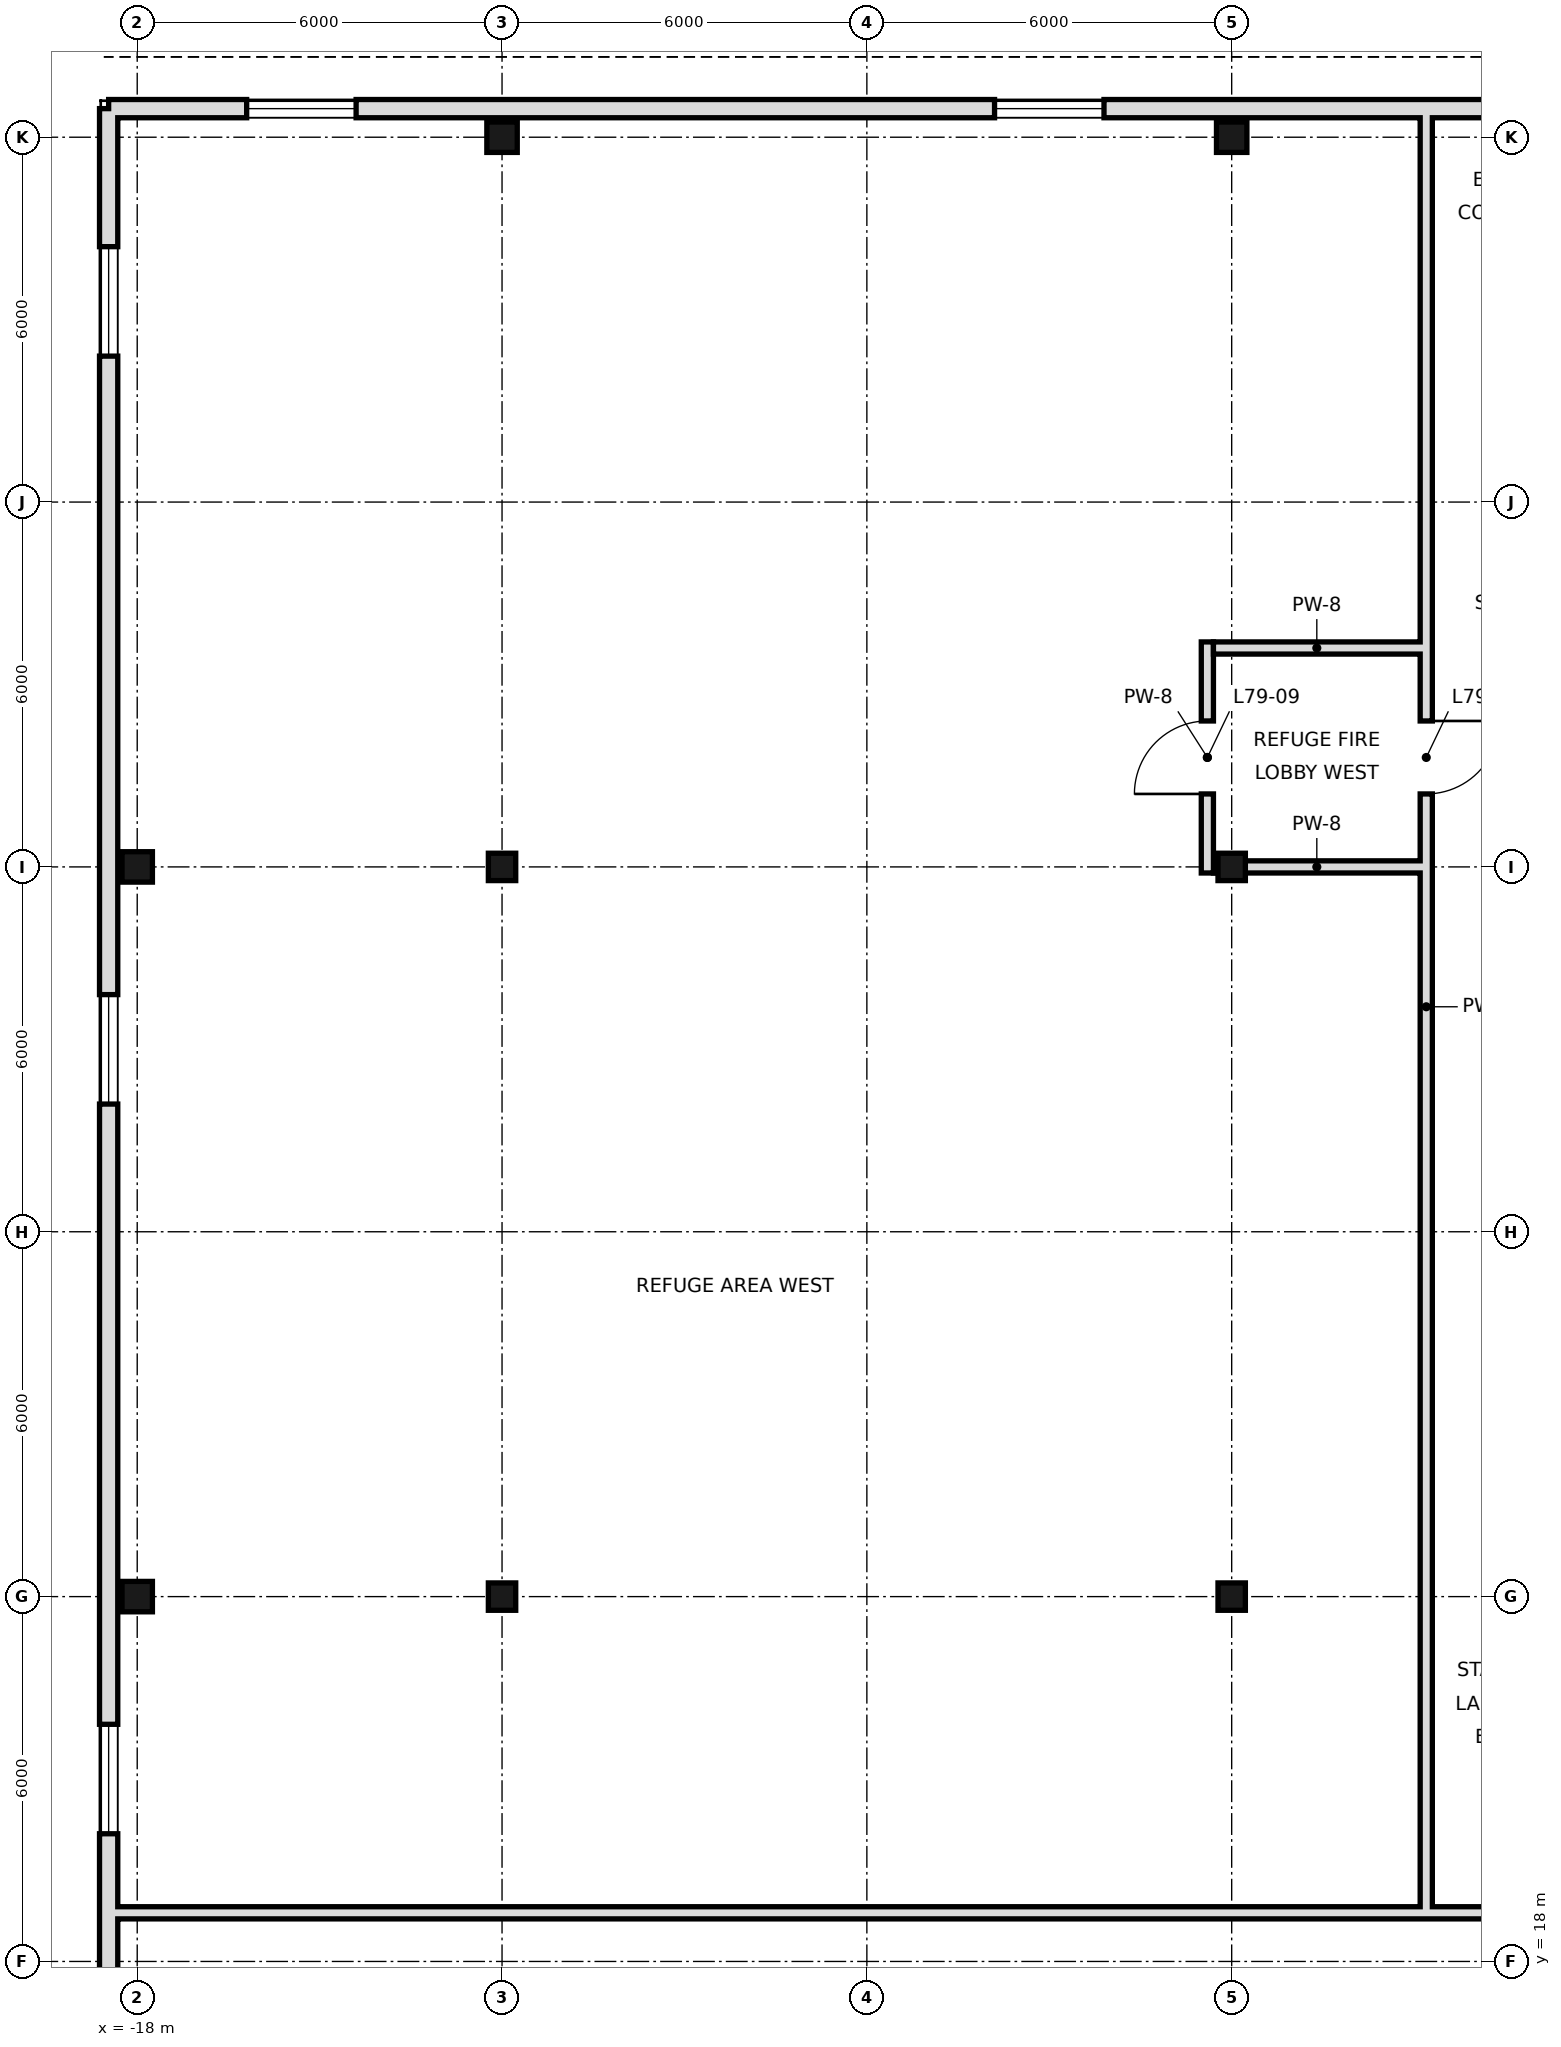
"""IFC4 building model, lengths in metres.
Left out: names, types, materials, properties, quantities, classifications, styles, units other than length and angle.
Written with IfcOpenShell. Run it as: python <this file> out.ifc"""

import sys

from ifc_helpers import new_model, si_unit, direction, frame, frame_2d, origin, origin_2d, place, context, subcontext, project, spatial, rectangle, hollow_rectangle, extrude, element, fill, save


model = new_model("IFC4")
c1 = context("Model", 3, precision=1e-05, world=origin(), true_north=direction((0.0, 1.0)))
c2 = subcontext(c1, "Body", "Model", "MODEL_VIEW")
j1 = project(units=[si_unit("LENGTHUNIT", "METRE"), si_unit("PLANEANGLEUNIT", "RADIAN")], contexts=[c1])
p1 = place(None, origin())
s1 = spatial("IfcSite", under=j1, at=p1, CompositionType="ELEMENT")
p2 = place(p1, origin())
s2 = spatial("IfcBuilding", under=s1, at=p2, CompositionType="ELEMENT")
p3 = place(p2, frame((0.0, 0.0, 331.2)))
s3 = spatial("IfcBuildingStorey", under=s2, at=p3, CompositionType="ELEMENT", Elevation=331.2)
for number, where, z_axis, x_axis in (
    (1, (-18.0, 24.0, 0.0), (0.0, 0.0, 1.0), (1.0, 0.0, 0.0)),
    (2, (-18.0, 36.0, 0.0), (0.0, 0.0, 1.0), (1.0, 0.0, 0.0)),
):
    element("IfcColumn", number, at=place(p3, frame(where, z_axis=z_axis, x_axis=x_axis)), inside=s3, PredefinedType="COLUMN", context=c2, shape_type="SweptSolid", body=[
        extrude(hollow_rectangle(XDim=0.5, YDim=0.5, WallThickness=0.025, at=origin_2d()), origin(), (0.0, 0.0, 1.0), 6.6),
    ])
for number, where, z_axis, x_axis in (
    (3, (-12.0, 24.0, 0.0), (0.0, 0.0, 1.0), (1.0, 0.0, 0.0)),
    (4, (-12.0, 36.0, 0.0), (0.0, 0.0, 1.0), (1.0, 0.0, 0.0)),
):
    element("IfcColumn", number, at=place(p3, frame(where, z_axis=z_axis, x_axis=x_axis)), inside=s3, PredefinedType="COLUMN", context=c2, shape_type="SweptSolid", body=[
        extrude(hollow_rectangle(XDim=0.45, YDim=0.45, WallThickness=0.022, at=origin_2d()), origin(), (0.0, 0.0, 1.0), 6.6),
    ])
p4 = place(p3, frame((-12.0, 48.0, 0.0), z_axis=(0.0, 0.0, 1.0), x_axis=(1.0, 0.0, 0.0)))
e5 = element("IfcColumn", 5, at=p4, inside=s3, PredefinedType="COLUMN", context=c2, shape_type="SweptSolid", body=[
    extrude(hollow_rectangle(XDim=0.5, YDim=0.5, WallThickness=0.025, at=origin_2d()), origin(), (0.0, 0.0, 1.0), 6.6),
])
for number, where, z_axis, x_axis in (
    (6, (0.0, 24.0, 0.0), (0.0, 0.0, 1.0), (1.0, 0.0, 0.0)),
    (7, (0.0, 36.0, 0.0), (0.0, 0.0, 1.0), (1.0, 0.0, 0.0)),
):
    element("IfcColumn", number, at=place(p3, frame(where, z_axis=z_axis, x_axis=x_axis)), inside=s3, PredefinedType="COLUMN", context=c2, shape_type="SweptSolid", body=[
        extrude(hollow_rectangle(XDim=0.45, YDim=0.45, WallThickness=0.022, at=origin_2d()), origin(), (0.0, 0.0, 1.0), 6.6),
    ])
p5 = place(p3, frame((0.0, 48.0, 0.0), z_axis=(0.0, 0.0, 1.0), x_axis=(1.0, 0.0, 0.0)))
e8 = element("IfcColumn", 8, at=p5, inside=s3, PredefinedType="COLUMN", context=c2, shape_type="SweptSolid", body=[
    extrude(hollow_rectangle(XDim=0.5, YDim=0.5, WallThickness=0.025, at=origin_2d()), origin(), (0.0, 0.0, 1.0), 6.6),
])
p6 = place(p3, frame((48.47, 48.47, 0.0), z_axis=(0.0, 0.0, 1.0), x_axis=(-1.0, 0.0, 0.0)))
e9 = element("IfcWall", 9, at=p6, inside=s3, PredefinedType="SOLIDWALL", context=c2, shape_type="SweptSolid", body=[
    extrude(rectangle(XDim=66.94, YDim=0.3, at=frame_2d((33.47, 0.0))), origin(), (0.0, 0.0, 1.0), 6.35),
])
p7 = place(p6, frame((2.27, 0.0, 0.9)))
e10 = element("IfcOpeningElement", 10, at=p7, cuts=e9, PredefinedType="OPENING", context=c2, shape_type="SweptSolid", body=[
    extrude(rectangle(XDim=1.8, YDim=1.5, at=frame_2d((0.9, 0.75))), frame((0.0, 0.16, 0.0), z_axis=(0.0, -1.0, 0.0), x_axis=(1.0, 0.0, 0.0)), (0.0, 0.0, 1.0), 0.32),
])
p8 = place(p6, frame((14.57, 0.0, 0.9)))
e11 = element("IfcOpeningElement", 11, at=p8, cuts=e9, PredefinedType="OPENING", context=c2, shape_type="SweptSolid", body=[
    extrude(rectangle(XDim=1.8, YDim=1.5, at=frame_2d((0.9, 0.75))), frame((0.0, 0.16, 0.0), z_axis=(0.0, -1.0, 0.0), x_axis=(1.0, 0.0, 0.0)), (0.0, 0.0, 1.0), 0.32),
])
p9 = place(p6, frame((26.57, 0.0, 0.9)))
e12 = element("IfcOpeningElement", 12, at=p9, cuts=e9, PredefinedType="OPENING", context=c2, shape_type="SweptSolid", body=[
    extrude(rectangle(XDim=1.8, YDim=1.5, at=frame_2d((0.9, 0.75))), frame((0.0, 0.16, 0.0), z_axis=(0.0, -1.0, 0.0), x_axis=(1.0, 0.0, 0.0)), (0.0, 0.0, 1.0), 0.32),
])
p10 = place(p6, frame((38.57, 0.0, 0.9)))
e13 = element("IfcOpeningElement", 13, at=p10, cuts=e9, PredefinedType="OPENING", context=c2, shape_type="SweptSolid", body=[
    extrude(rectangle(XDim=1.8, YDim=1.5, at=frame_2d((0.9, 0.75))), frame((0.0, 0.16, 0.0), z_axis=(0.0, -1.0, 0.0), x_axis=(1.0, 0.0, 0.0)), (0.0, 0.0, 1.0), 0.32),
])
p11 = place(p6, frame((50.57, 0.0, 0.9)))
e14 = element("IfcOpeningElement", 14, at=p11, cuts=e9, PredefinedType="OPENING", context=c2, shape_type="SweptSolid", body=[
    extrude(rectangle(XDim=1.8, YDim=1.5, at=frame_2d((0.9, 0.75))), frame((0.0, 0.16, 0.0), z_axis=(0.0, -1.0, 0.0), x_axis=(1.0, 0.0, 0.0)), (0.0, 0.0, 1.0), 0.32),
])
p12 = place(p6, frame((62.87, 0.0, 0.9)))
e15 = element("IfcOpeningElement", 15, at=p12, cuts=e9, PredefinedType="OPENING", context=c2, shape_type="SweptSolid", body=[
    extrude(rectangle(XDim=1.8, YDim=1.5, at=frame_2d((0.9, 0.75))), frame((0.0, 0.16, 0.0), z_axis=(0.0, -1.0, 0.0), x_axis=(1.0, 0.0, 0.0)), (0.0, 0.0, 1.0), 0.32),
])
p13 = place(p3, frame((-18.47, 48.47, 0.0), z_axis=(0.0, 0.0, 1.0), x_axis=(0.0, -1.0, 0.0)))
e16 = element("IfcWall", 16, at=p13, inside=s3, PredefinedType="SOLIDWALL", context=c2, shape_type="SweptSolid", body=[
    extrude(rectangle(XDim=36.665, YDim=0.3, at=frame_2d((18.332, 0.0))), origin(), (0.0, 0.0, 1.0), 6.35),
])
p14 = place(p13, frame((2.27, 0.0, 0.9)))
e17 = element("IfcOpeningElement", 17, at=p14, cuts=e16, PredefinedType="OPENING", context=c2, shape_type="SweptSolid", body=[
    extrude(rectangle(XDim=1.8, YDim=1.5, at=frame_2d((0.9, 0.75))), frame((0.0, 0.16, 0.0), z_axis=(0.0, -1.0, 0.0), x_axis=(1.0, 0.0, 0.0)), (0.0, 0.0, 1.0), 0.32),
])
p15 = place(p13, frame((14.57, 0.0, 0.9)))
e18 = element("IfcOpeningElement", 18, at=p15, cuts=e16, PredefinedType="OPENING", context=c2, shape_type="SweptSolid", body=[
    extrude(rectangle(XDim=1.8, YDim=1.5, at=frame_2d((0.9, 0.75))), frame((0.0, 0.16, 0.0), z_axis=(0.0, -1.0, 0.0), x_axis=(1.0, 0.0, 0.0)), (0.0, 0.0, 1.0), 0.32),
])
p16 = place(p13, frame((26.57, 0.0, 0.9)))
e19 = element("IfcOpeningElement", 19, at=p16, cuts=e16, PredefinedType="OPENING", context=c2, shape_type="SweptSolid", body=[
    extrude(rectangle(XDim=1.8, YDim=1.5, at=frame_2d((0.9, 0.75))), frame((0.0, 0.16, 0.0), z_axis=(0.0, -1.0, 0.0), x_axis=(1.0, 0.0, 0.0)), (0.0, 0.0, 1.0), 0.32),
])
p17 = place(p3, frame((-0.4, 35.9, 0.0), z_axis=(0.0, 0.0, 1.0), x_axis=(0.0, 1.0, 0.0)))
e20 = element("IfcWall", 20, at=p17, inside=s3, PredefinedType="SOLIDWALL", context=c2, shape_type="SweptSolid", body=[
    extrude(rectangle(XDim=3.8, YDim=0.2, at=frame_2d((1.9, 0.0))), origin(), (0.0, 0.0, 1.0), 6.35),
])
p18 = place(p17, frame((1.3, 0.0, 0.0)))
e21 = element("IfcOpeningElement", 21, at=p18, cuts=e20, PredefinedType="OPENING", context=c2, shape_type="SweptSolid", body=[
    extrude(rectangle(XDim=1.2, YDim=2.4, at=frame_2d((0.6, 1.2))), frame((0.0, 0.11, 0.0), z_axis=(0.0, -1.0, 0.0), x_axis=(1.0, 0.0, 0.0)), (0.0, 0.0, 1.0), 0.22),
])
p19 = place(p3, frame((3.2, 18.9, 0.0), z_axis=(0.0, 0.0, 1.0), x_axis=(0.0, 1.0, 0.0)))
e22 = element("IfcWall", 22, at=p19, inside=s3, PredefinedType="SOLIDWALL", context=c2, shape_type="SweptSolid", body=[
    extrude(rectangle(XDim=29.6, YDim=0.2, at=frame_2d((14.8, 0.0))), origin(), (0.0, 0.0, 1.0), 5.65),
])
p20 = place(p19, frame((18.3, 0.0, 0.0)))
e23 = element("IfcOpeningElement", 23, at=p20, cuts=e22, PredefinedType="OPENING", context=c2, shape_type="SweptSolid", body=[
    extrude(rectangle(XDim=1.2, YDim=2.4, at=frame_2d((0.6, 1.2))), frame((0.0, 0.11, 0.0), z_axis=(0.0, -1.0, 0.0), x_axis=(1.0, 0.0, 0.0)), (0.0, 0.0, 1.0), 0.22),
])
p21 = place(p3, frame((-18.5, 18.8, 0.0), z_axis=(0.0, 0.0, 1.0), x_axis=(1.0, 0.0, 0.0)))
e24 = element("IfcWall", 24, at=p21, inside=s3, PredefinedType="SOLIDWALL", context=c2, shape_type="SweptSolid", body=[
    extrude(rectangle(XDim=67.0, YDim=0.2, at=frame_2d((33.5, 0.0))), origin(), (0.0, 0.0, 1.0), 5.65),
])
p22 = place(p21, frame((29.1, 0.0, 0.0)))
e25 = element("IfcOpeningElement", 25, at=p22, cuts=e24, PredefinedType="OPENING", context=c2, shape_type="SweptSolid", body=[
    extrude(rectangle(XDim=1.2, YDim=2.4, at=frame_2d((0.6, 1.2))), frame((0.0, 0.11, 0.0), z_axis=(0.0, -1.0, 0.0), x_axis=(1.0, 0.0, 0.0)), (0.0, 0.0, 1.0), 0.22),
])
p23 = place(p3, frame((-0.3, 36.0, 0.0), z_axis=(0.0, 0.0, 1.0), x_axis=(1.0, 0.0, 0.0)))
e26 = element("IfcWall", 26, at=p23, inside=s3, PredefinedType="SOLIDWALL", context=c2, shape_type="SweptSolid", body=[
    extrude(rectangle(XDim=3.4, YDim=0.2, at=frame_2d((1.7, 0.0))), origin(), (0.0, 0.0, 1.0), 6.35),
])
p24 = place(p3, frame((-0.3, 39.6, 0.0), z_axis=(0.0, 0.0, 1.0), x_axis=(1.0, 0.0, 0.0)))
e27 = element("IfcWall", 27, at=p24, inside=s3, PredefinedType="SOLIDWALL", context=c2, shape_type="SweptSolid", body=[
    extrude(rectangle(XDim=3.4, YDim=0.2, at=frame_2d((1.7, 0.0))), origin(), (0.0, 0.0, 1.0), 5.65),
])
p25 = place(p11, origin())
e28 = element("IfcWindow", 28, at=p25, inside=s3, PartitioningType="SINGLE_PANEL", PredefinedType="WINDOW", context=c2, shape_type="SweptSolid", body=[
    extrude(rectangle(XDim=1.8, YDim=1.5, at=frame_2d((0.9, 0.75))), frame((0.0, 0.03, 0.0), z_axis=(0.0, -1.0, 0.0), x_axis=(1.0, 0.0, 0.0)), (0.0, 0.0, 1.0), 0.06),
])
fill(e14, e28)
p26 = place(p12, origin())
e29 = element("IfcWindow", 29, at=p26, inside=s3, PartitioningType="SINGLE_PANEL", PredefinedType="WINDOW", context=c2, shape_type="SweptSolid", body=[
    extrude(rectangle(XDim=1.8, YDim=1.5, at=frame_2d((0.9, 0.75))), frame((0.0, 0.03, 0.0), z_axis=(0.0, -1.0, 0.0), x_axis=(1.0, 0.0, 0.0)), (0.0, 0.0, 1.0), 0.06),
])
fill(e15, e29)
p27 = place(p14, origin())
e30 = element("IfcWindow", 30, at=p27, inside=s3, PartitioningType="SINGLE_PANEL", PredefinedType="WINDOW", context=c2, shape_type="SweptSolid", body=[
    extrude(rectangle(XDim=1.8, YDim=1.5, at=frame_2d((0.9, 0.75))), frame((0.0, 0.03, 0.0), z_axis=(0.0, -1.0, 0.0), x_axis=(1.0, 0.0, 0.0)), (0.0, 0.0, 1.0), 0.06),
])
fill(e17, e30)
p28 = place(p15, origin())
e31 = element("IfcWindow", 31, at=p28, inside=s3, PartitioningType="SINGLE_PANEL", PredefinedType="WINDOW", context=c2, shape_type="SweptSolid", body=[
    extrude(rectangle(XDim=1.8, YDim=1.5, at=frame_2d((0.9, 0.75))), frame((0.0, 0.03, 0.0), z_axis=(0.0, -1.0, 0.0), x_axis=(1.0, 0.0, 0.0)), (0.0, 0.0, 1.0), 0.06),
])
fill(e18, e31)
p29 = place(p16, origin())
e32 = element("IfcWindow", 32, at=p29, inside=s3, PartitioningType="SINGLE_PANEL", PredefinedType="WINDOW", context=c2, shape_type="SweptSolid", body=[
    extrude(rectangle(XDim=1.8, YDim=1.5, at=frame_2d((0.9, 0.75))), frame((0.0, 0.03, 0.0), z_axis=(0.0, -1.0, 0.0), x_axis=(1.0, 0.0, 0.0)), (0.0, 0.0, 1.0), 0.06),
])
fill(e19, e32)
p30 = place(p18, origin())
e33 = element("IfcDoor", 33, at=p30, inside=s3, OperationType="SINGLE_SWING_LEFT", PredefinedType="DOOR", context=c2, shape_type="SweptSolid", body=[
    extrude(rectangle(XDim=1.2, YDim=2.4, at=frame_2d((0.6, 1.2))), frame((0.0, 0.025, 0.0), z_axis=(0.0, -1.0, 0.0), x_axis=(1.0, 0.0, 0.0)), (0.0, 0.0, 1.0), 0.05),
])
fill(e21, e33)
p31 = place(p20, origin())
e34 = element("IfcDoor", 34, at=p31, inside=s3, OperationType="SINGLE_SWING_RIGHT", PredefinedType="DOOR", context=c2, shape_type="SweptSolid", body=[
    extrude(rectangle(XDim=1.2, YDim=2.4, at=frame_2d((0.6, 1.2))), frame((0.0, 0.025, 0.0), z_axis=(0.0, -1.0, 0.0), x_axis=(1.0, 0.0, 0.0)), (0.0, 0.0, 1.0), 0.05),
])
fill(e23, e34)
save(model, sys.argv[1])
